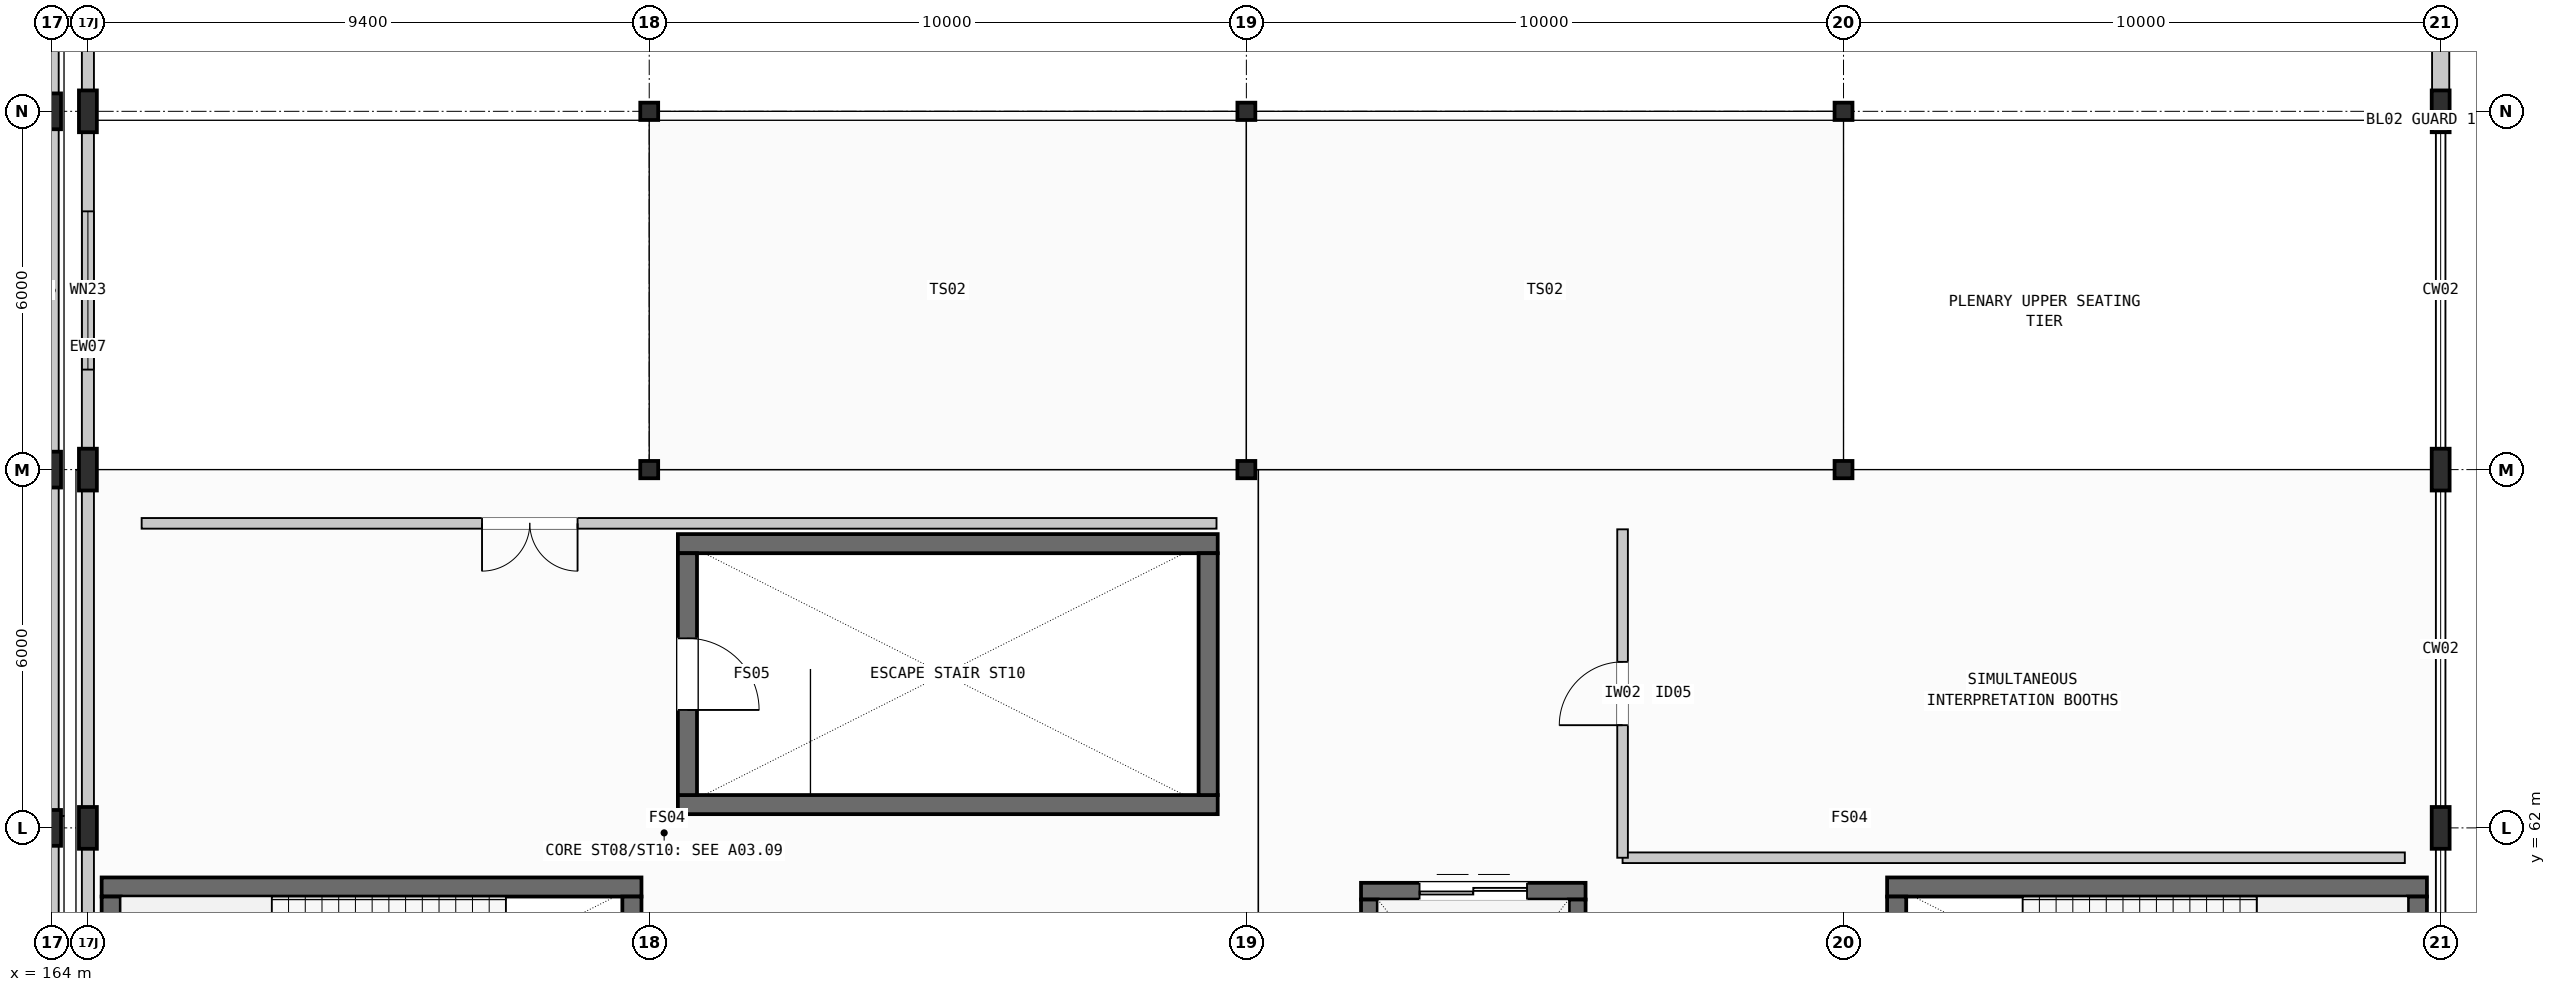
"""IFC4 building model, lengths in metres.
Left out: names, types, materials, properties, quantities, classifications, styles, units other than length and angle.
Written with IfcOpenShell. Run it as: python <this file> out.ifc"""

import sys

from ifc_helpers import new_model, si_unit, direction, frame, frame_2d, origin, origin_2d, place, context, subcontext, project, spatial, rectangle, i_section, extrude, element, fill, save


model = new_model("IFC4")
c1 = context("Model", 3, precision=1e-05, world=origin(), true_north=direction((0.0, 1.0)))
c2 = subcontext(c1, "Body", "Model", "MODEL_VIEW")
j1 = project(units=[si_unit("LENGTHUNIT", "METRE"), si_unit("PLANEANGLEUNIT", "RADIAN")], contexts=[c1])
p1 = place(None, origin())
s1 = spatial("IfcSite", under=j1, at=p1, CompositionType="ELEMENT")
p2 = place(p1, origin())
s2 = spatial("IfcBuilding", under=s1, at=p2, CompositionType="ELEMENT")
p3 = place(p2, frame((0.0, 0.0, 11.4)))
s3 = spatial("IfcBuildingStorey", under=s2, at=p3, CompositionType="ELEMENT", Elevation=11.4)
for number, where, z_axis, x_axis in (
    (1, (164.0, 62.0, 0.0), (0.0, 0.0, 1.0), (1.0, 0.0, 0.0)),
    (2, (164.0, 68.0, 0.0), (0.0, 0.0, 1.0), (1.0, 0.0, 0.0)),
    (3, (164.0, 74.0, 0.0), (0.0, 0.0, 1.0), (1.0, 0.0, 0.0)),
):
    element("IfcColumn", number, at=place(p3, frame(where, z_axis=z_axis, x_axis=x_axis)), inside=s3, PredefinedType="COLUMN", context=c2, shape_type="SweptSolid", body=[
        extrude(i_section(OverallWidth=0.3, OverallDepth=0.6, WebThickness=0.015, FlangeThickness=0.03, FilletRadius=0.027, at=origin_2d()), origin(), (0.0, 0.0, 1.0), 5.4),
    ])
for number, where, z_axis, x_axis in (
    (4, (164.6, 62.0, 0.0), (0.0, 0.0, 1.0), (1.0, 0.0, 0.0)),
    (5, (164.6, 68.0, 0.0), (0.0, 0.0, 1.0), (1.0, 0.0, 0.0)),
    (6, (164.6, 74.0, 0.0), (0.0, 0.0, 1.0), (1.0, 0.0, 0.0)),
):
    element("IfcColumn", number, at=place(p3, frame(where, z_axis=z_axis, x_axis=x_axis)), inside=s3, PredefinedType="COLUMN", context=c2, shape_type="SweptSolid", body=[
        extrude(i_section(OverallWidth=0.3, OverallDepth=0.7, WebThickness=0.017, FlangeThickness=0.032, FilletRadius=0.027, at=origin_2d()), origin(), (0.0, 0.0, 1.0), 5.4),
    ])
for number, where, z_axis, x_axis in (
    (7, (174.0, 68.0, 0.0), (0.0, 0.0, 1.0), (1.0, 0.0, 0.0)),
    (8, (174.0, 74.0, 0.0), (0.0, 0.0, 1.0), (1.0, 0.0, 0.0)),
    (9, (184.0, 68.0, 0.0), (0.0, 0.0, 1.0), (1.0, 0.0, 0.0)),
    (10, (184.0, 74.0, 0.0), (0.0, 0.0, 1.0), (1.0, 0.0, 0.0)),
    (11, (194.0, 68.0, 0.0), (0.0, 0.0, 1.0), (1.0, 0.0, 0.0)),
    (12, (194.0, 74.0, 0.0), (0.0, 0.0, 1.0), (1.0, 0.0, 0.0)),
):
    element("IfcColumn", number, at=place(p3, frame(where, z_axis=z_axis, x_axis=x_axis)), inside=s3, PredefinedType="COLUMN", context=c2, shape_type="SweptSolid", body=[
        extrude(i_section(OverallWidth=0.3, OverallDepth=0.29, WebThickness=0.009, FlangeThickness=0.014, FilletRadius=0.027, at=origin_2d()), origin(), (0.0, 0.0, 1.0), 5.4),
    ])
for number, where, z_axis, x_axis in (
    (13, (204.0, 62.0, 0.0), (0.0, 0.0, 1.0), (1.0, 0.0, 0.0)),
    (14, (204.0, 68.0, 0.0), (0.0, 0.0, 1.0), (1.0, 0.0, 0.0)),
    (15, (204.0, 74.0, 0.0), (0.0, 0.0, 1.0), (1.0, 0.0, 0.0)),
):
    element("IfcColumn", number, at=place(p3, frame(where, z_axis=z_axis, x_axis=x_axis)), inside=s3, PredefinedType="COLUMN", context=c2, shape_type="SweptSolid", body=[
        extrude(i_section(OverallWidth=0.3, OverallDepth=0.7, WebThickness=0.017, FlangeThickness=0.032, FilletRadius=0.027, at=origin_2d()), origin(), (0.0, 0.0, 1.0), 5.4),
    ])
p4 = place(p3, frame((164.83, 61.01, 0.0), z_axis=(0.0, 0.0, 1.0), x_axis=(1.0, 0.0, 0.0)))
e16 = element("IfcWall", 16, at=p4, inside=s3, PredefinedType="SHEAR", context=c2, shape_type="SweptSolid", body=[
    extrude(rectangle(XDim=9.04, YDim=0.32, at=frame_2d((4.52, 0.0))), origin(), (0.0, 0.0, 1.0), 5.4),
])
p5 = place(p3, frame((164.99, 56.8, 0.0), z_axis=(0.0, 0.0, 1.0), x_axis=(0.0, 1.0, 0.0)))
e17 = element("IfcWall", 17, at=p5, inside=s3, PredefinedType="SHEAR", context=c2, shape_type="SweptSolid", body=[
    extrude(rectangle(XDim=4.05, YDim=0.32, at=frame_2d((2.025, 0.0))), origin(), (0.0, 0.0, 1.0), 5.4),
])
p6 = place(p3, frame((173.71, 56.8, 0.0), z_axis=(0.0, 0.0, 1.0), x_axis=(0.0, 1.0, 0.0)))
e18 = element("IfcWall", 18, at=p6, inside=s3, PredefinedType="SHEAR", context=c2, shape_type="SweptSolid", body=[
    extrude(rectangle(XDim=4.05, YDim=0.32, at=frame_2d((2.025, 0.0))), origin(), (0.0, 0.0, 1.0), 5.4),
])
p7 = place(p6, frame((1.425, 0.0, 0.0)))
e19 = element("IfcOpeningElement", 19, at=p7, cuts=e18, PredefinedType="OPENING", context=c2, shape_type="SweptSolid", body=[
    extrude(rectangle(XDim=1.2, YDim=2.2, at=frame_2d((0.6, 1.1))), frame((0.0, 0.17, 0.0), z_axis=(0.0, -1.0, 0.0), x_axis=(1.0, 0.0, 0.0)), (0.0, 0.0, 1.0), 0.34),
])
p8 = place(p3, frame((194.73, 61.01, 0.0), z_axis=(0.0, 0.0, 1.0), x_axis=(1.0, 0.0, 0.0)))
e20 = element("IfcWall", 20, at=p8, inside=s3, PredefinedType="SHEAR", context=c2, shape_type="SweptSolid", body=[
    extrude(rectangle(XDim=9.04, YDim=0.32, at=frame_2d((4.52, 0.0))), origin(), (0.0, 0.0, 1.0), 5.4),
])
p9 = place(p3, frame((194.89, 56.8, 0.0), z_axis=(0.0, 0.0, 1.0), x_axis=(0.0, 1.0, 0.0)))
e21 = element("IfcWall", 21, at=p9, inside=s3, PredefinedType="SHEAR", context=c2, shape_type="SweptSolid", body=[
    extrude(rectangle(XDim=4.05, YDim=0.32, at=frame_2d((2.025, 0.0))), origin(), (0.0, 0.0, 1.0), 5.4),
])
p10 = place(p9, frame((1.425, 0.0, 0.0)))
e22 = element("IfcOpeningElement", 22, at=p10, cuts=e21, PredefinedType="OPENING", context=c2, shape_type="SweptSolid", body=[
    extrude(rectangle(XDim=1.2, YDim=2.2, at=frame_2d((0.6, 1.1))), frame((0.0, 0.17, 0.0), z_axis=(0.0, -1.0, 0.0), x_axis=(1.0, 0.0, 0.0)), (0.0, 0.0, 1.0), 0.34),
])
p11 = place(p3, frame((203.61, 56.8, 0.0), z_axis=(0.0, 0.0, 1.0), x_axis=(0.0, 1.0, 0.0)))
e23 = element("IfcWall", 23, at=p11, inside=s3, PredefinedType="SHEAR", context=c2, shape_type="SweptSolid", body=[
    extrude(rectangle(XDim=4.05, YDim=0.32, at=frame_2d((2.025, 0.0))), origin(), (0.0, 0.0, 1.0), 5.4),
])
for number, where, z_axis, x_axis in (
    (24, (174.48, 62.39, 0.0), (0.0, 0.0, 1.0), (1.0, 0.0, 0.0)),
    (25, (174.48, 66.76, 0.0), (0.0, 0.0, 1.0), (1.0, 0.0, 0.0)),
):
    element("IfcWall", number, at=place(p3, frame(where, z_axis=z_axis, x_axis=x_axis)), inside=s3, PredefinedType="SHEAR", context=c2, shape_type="SweptSolid", body=[
        extrude(rectangle(XDim=9.04, YDim=0.32, at=frame_2d((4.52, 0.0))), origin(), (0.0, 0.0, 1.0), 4.2),
    ])
p12 = place(p3, frame((174.64, 62.55, 0.0), z_axis=(0.0, 0.0, 1.0), x_axis=(0.0, 1.0, 0.0)))
e26 = element("IfcWall", 26, at=p12, inside=s3, PredefinedType="SHEAR", context=c2, shape_type="SweptSolid", body=[
    extrude(rectangle(XDim=4.05, YDim=0.32, at=frame_2d((2.025, 0.0))), origin(), (0.0, 0.0, 1.0), 4.2),
])
p13 = place(p12, frame((1.425, 0.0, 0.0)))
e27 = element("IfcOpeningElement", 27, at=p13, cuts=e26, PredefinedType="OPENING", context=c2, shape_type="SweptSolid", body=[
    extrude(rectangle(XDim=1.2, YDim=2.2, at=frame_2d((0.6, 1.1))), frame((0.0, 0.17, 0.0), z_axis=(0.0, -1.0, 0.0), x_axis=(1.0, 0.0, 0.0)), (0.0, 0.0, 1.0), 0.34),
])
p14 = place(p3, frame((183.36, 62.55, 0.0), z_axis=(0.0, 0.0, 1.0), x_axis=(0.0, 1.0, 0.0)))
e28 = element("IfcWall", 28, at=p14, inside=s3, PredefinedType="SHEAR", context=c2, shape_type="SweptSolid", body=[
    extrude(rectangle(XDim=4.05, YDim=0.32, at=frame_2d((2.025, 0.0))), origin(), (0.0, 0.0, 1.0), 4.2),
])
p15 = place(p3, frame((185.92, 60.94, 0.0), z_axis=(0.0, 0.0, 1.0), x_axis=(1.0, 0.0, 0.0)))
e29 = element("IfcWall", 29, at=p15, inside=s3, PredefinedType="SHEAR", context=c2, shape_type="SweptSolid", body=[
    extrude(rectangle(XDim=3.76, YDim=0.28, at=frame_2d((1.88, 0.0))), origin(), (0.0, 0.0, 1.0), 4.2),
])
p16 = place(p15, frame((0.98, 0.0, 0.0)))
e30 = element("IfcOpeningElement", 30, at=p16, cuts=e29, PredefinedType="OPENING", context=c2, shape_type="SweptSolid", body=[
    extrude(rectangle(XDim=1.8, YDim=2.3, at=frame_2d((0.9, 1.15))), frame((0.0, 0.15, 0.0), z_axis=(0.0, -1.0, 0.0), x_axis=(1.0, 0.0, 0.0)), (0.0, 0.0, 1.0), 0.3),
])
for number, where, z_axis, x_axis in (
    (31, (186.06, 56.8, 0.0), (0.0, 0.0, 1.0), (0.0, 1.0, 0.0)),
    (32, (189.54, 56.8, 0.0), (0.0, 0.0, 1.0), (0.0, 1.0, 0.0)),
):
    element("IfcWall", number, at=place(p3, frame(where, z_axis=z_axis, x_axis=x_axis)), inside=s3, PredefinedType="SHEAR", context=c2, shape_type="SweptSolid", body=[
        extrude(rectangle(XDim=4.0, YDim=0.28, at=frame_2d((2.0, 0.0))), origin(), (0.0, 0.0, 1.0), 4.2),
    ])
for number, where, z_axis, x_axis in (
    (33, (164.6, 56.346, 0.0), (0.0, 0.0, 1.0), (0.0, 1.0, 0.0)),
    (34, (164.6, 62.346, 0.0), (0.0, 0.0, 1.0), (0.0, 1.0, 0.0)),
):
    element("IfcWall", number, at=place(p3, frame(where, z_axis=z_axis, x_axis=x_axis)), inside=s3, PredefinedType="STANDARD", context=c2, shape_type="SweptSolid", body=[
        extrude(rectangle(XDim=5.308, YDim=0.202, at=frame_2d((2.654, 0.0))), origin(), (0.0, 0.0, 1.0), 4.548),
    ])
p17 = place(p3, frame((164.6, 68.346, 0.0), z_axis=(0.0, 0.0, 1.0), x_axis=(0.0, 1.0, 0.0)))
e35 = element("IfcWall", 35, at=p17, inside=s3, PredefinedType="STANDARD", context=c2, shape_type="SweptSolid", body=[
    extrude(rectangle(XDim=5.308, YDim=0.202, at=frame_2d((2.654, 0.0))), origin(), (0.0, 0.0, 1.0), 4.548),
])
p18 = place(p17, frame((1.329, 0.0, 1.0)))
e36 = element("IfcOpeningElement", 36, at=p18, cuts=e35, PredefinedType="OPENING", context=c2, shape_type="SweptSolid", body=[
    extrude(rectangle(XDim=2.65, YDim=2.35, at=frame_2d((1.325, 1.175))), frame((0.0, 0.111, 0.0), z_axis=(0.0, -1.0, 0.0), x_axis=(1.0, 0.0, 0.0)), (0.0, 0.0, 1.0), 0.222),
])
p19 = place(p3, frame((204.0, 74.346, 0.0), z_axis=(0.0, 0.0, 1.0), x_axis=(0.0, 1.0, 0.0)))
e37 = element("IfcWall", 37, at=p19, inside=s3, PredefinedType="STANDARD", context=c2, shape_type="SweptSolid", body=[
    extrude(rectangle(XDim=5.308, YDim=0.288, at=frame_2d((2.654, 0.0))), origin(), (0.0, 0.0, 1.0), 4.6),
])
p20 = place(p19, frame((1.004, 0.0, 1.0)))
e38 = element("IfcOpeningElement", 38, at=p20, cuts=e37, PredefinedType="OPENING", context=c2, shape_type="SweptSolid", body=[
    extrude(rectangle(XDim=3.3, YDim=2.35, at=frame_2d((1.65, 1.175))), frame((0.0, 0.154, 0.0), z_axis=(0.0, -1.0, 0.0), x_axis=(1.0, 0.0, 0.0)), (0.0, 0.0, 1.0), 0.308),
])
p21 = place(p3, frame((164.6, 74.346, 0.0), z_axis=(0.0, 0.0, 1.0), x_axis=(0.0, 1.0, 0.0)))
e39 = element("IfcWall", 39, at=p21, inside=s3, PredefinedType="STANDARD", context=c2, shape_type="SweptSolid", body=[
    extrude(rectangle(XDim=5.308, YDim=0.202, at=frame_2d((2.654, 0.0))), origin(), (0.0, 0.0, 1.0), 4.6),
])
p22 = place(p21, frame((1.929, 0.0, 1.0)))
e40 = element("IfcOpeningElement", 40, at=p22, cuts=e39, PredefinedType="OPENING", context=c2, shape_type="SweptSolid", body=[
    extrude(rectangle(XDim=1.45, YDim=2.2, at=frame_2d((0.725, 1.1))), frame((0.0, 0.111, 0.0), z_axis=(0.0, -1.0, 0.0), x_axis=(1.0, 0.0, 0.0)), (0.0, 0.0, 1.0), 0.222),
])
p23 = place(p3, frame((164.0, 55.196, 0.0), z_axis=(0.0, 0.0, 1.0), x_axis=(0.0, 1.0, 0.0)))
e41 = element("IfcWall", 41, at=p23, inside=s3, PredefinedType="STANDARD", context=c2, shape_type="SweptSolid", body=[
    extrude(rectangle(XDim=6.508, YDim=0.222, at=frame_2d((3.254, 0.0))), origin(), (0.0, 0.0, 1.0), 4.548),
])
for number, where, z_axis, x_axis in (
    (42, (164.0, 62.296, 0.0), (0.0, 0.0, 1.0), (0.0, 1.0, 0.0)),
    (43, (164.0, 68.296, 0.0), (0.0, 0.0, 1.0), (0.0, 1.0, 0.0)),
    (44, (164.0, 74.296, 0.0), (0.0, 0.0, 1.0), (0.0, 1.0, 0.0)),
):
    element("IfcWall", number, at=place(p3, frame(where, z_axis=z_axis, x_axis=x_axis)), inside=s3, PredefinedType="STANDARD", context=c2, shape_type="SweptSolid", body=[
        extrude(rectangle(XDim=5.408, YDim=0.222, at=frame_2d((2.704, 0.0))), origin(), (0.0, 0.0, 1.0), 4.548),
    ])
p24 = place(p3, frame((165.5, 67.1, 0.0), z_axis=(0.0, 0.0, 1.0), x_axis=(1.0, 0.0, 0.0)))
e45 = element("IfcWall", 45, at=p24, inside=s3, PredefinedType="PARTITIONING", context=c2, shape_type="SweptSolid", body=[
    extrude(rectangle(XDim=18.0, YDim=0.178, at=frame_2d((9.0, 0.0))), origin(), (0.0, 0.0, 1.0), 4.4),
])
p25 = place(p24, frame((5.7, 0.0, 0.0)))
e46 = element("IfcOpeningElement", 46, at=p25, cuts=e45, PredefinedType="OPENING", context=c2, shape_type="SweptSolid", body=[
    extrude(rectangle(XDim=1.6, YDim=2.2, at=frame_2d((0.8, 1.1))), frame((0.0, 0.099, 0.0), z_axis=(0.0, -1.0, 0.0), x_axis=(1.0, 0.0, 0.0)), (0.0, 0.0, 1.0), 0.198),
])
p26 = place(p3, frame((190.3, 61.5, 0.0), z_axis=(0.0, 0.0, 1.0), x_axis=(1.0, 0.0, 0.0)))
e47 = element("IfcWall", 47, at=p26, inside=s3, PredefinedType="PARTITIONING", context=c2, shape_type="SweptSolid", body=[
    extrude(rectangle(XDim=13.1, YDim=0.178, at=frame_2d((6.55, 0.0))), origin(), (0.0, 0.0, 1.0), 4.4),
])
p27 = place(p3, frame((190.3, 61.5, 0.0), z_axis=(0.0, 0.0, 1.0), x_axis=(0.0, 1.0, 0.0)))
e48 = element("IfcWall", 48, at=p27, inside=s3, PredefinedType="PARTITIONING", context=c2, shape_type="SweptSolid", body=[
    extrude(rectangle(XDim=5.5, YDim=0.178, at=frame_2d((2.75, 0.0))), origin(), (0.0, 0.0, 1.0), 4.4),
])
p28 = place(p27, frame((2.22, 0.0, 0.0)))
e49 = element("IfcOpeningElement", 49, at=p28, cuts=e48, PredefinedType="OPENING", context=c2, shape_type="SweptSolid", body=[
    extrude(rectangle(XDim=1.06, YDim=2.18, at=frame_2d((0.53, 1.09))), frame((0.0, 0.099, 0.0), z_axis=(0.0, -1.0, 0.0), x_axis=(1.0, 0.0, 0.0)), (0.0, 0.0, 1.0), 0.198),
])
p29 = place(p18, origin())
e50 = element("IfcWindow", 50, at=p29, inside=s3, PartitioningType="SINGLE_PANEL", PredefinedType="WINDOW", context=c2, shape_type="SweptSolid", body=[
    extrude(rectangle(XDim=2.65, YDim=2.35, at=frame_2d((1.325, 1.175))), frame((0.0, 0.03, 0.0), z_axis=(0.0, -1.0, 0.0), x_axis=(1.0, 0.0, 0.0)), (0.0, 0.0, 1.0), 0.06),
])
fill(e36, e50)
p30 = place(p13, frame((1.2, 0.0, 0.0), z_axis=(0.0, 0.0, 1.0), x_axis=(-1.0, 0.0, 0.0)))
e51 = element("IfcDoor", 51, at=p30, inside=s3, OperationType="SINGLE_SWING_RIGHT", PredefinedType="DOOR", context=c2, shape_type="SweptSolid", body=[
    extrude(rectangle(XDim=1.2, YDim=2.2, at=frame_2d((0.6, 1.1))), frame((0.0, 0.025, 0.0), z_axis=(0.0, -1.0, 0.0), x_axis=(1.0, 0.0, 0.0)), (0.0, 0.0, 1.0), 0.05),
])
fill(e27, e51)
p31 = place(p16, origin())
e52 = element("IfcDoor", 52, at=p31, inside=s3, OperationType="DOUBLE_DOOR_SLIDING", PredefinedType="DOOR", context=c2, shape_type="SweptSolid", body=[
    extrude(rectangle(XDim=1.8, YDim=2.3, at=frame_2d((0.9, 1.15))), frame((0.0, 0.025, 0.0), z_axis=(0.0, -1.0, 0.0), x_axis=(1.0, 0.0, 0.0)), (0.0, 0.0, 1.0), 0.05),
])
fill(e30, e52)
p32 = place(p25, frame((1.6, 0.0, 0.0), z_axis=(0.0, 0.0, 1.0), x_axis=(-1.0, 0.0, 0.0)))
e53 = element("IfcDoor", 53, at=p32, inside=s3, OperationType="DOUBLE_DOOR_SINGLE_SWING", PredefinedType="DOOR", context=c2, shape_type="SweptSolid", body=[
    extrude(rectangle(XDim=1.6, YDim=2.2, at=frame_2d((0.8, 1.1))), frame((0.0, 0.025, 0.0), z_axis=(0.0, -1.0, 0.0), x_axis=(1.0, 0.0, 0.0)), (0.0, 0.0, 1.0), 0.05),
])
fill(e46, e53)
p33 = place(p28, origin())
e54 = element("IfcDoor", 54, at=p33, inside=s3, OperationType="SINGLE_SWING_LEFT", PredefinedType="DOOR", context=c2, shape_type="SweptSolid", body=[
    extrude(rectangle(XDim=1.06, YDim=2.18, at=frame_2d((0.53, 1.09))), frame((0.0, 0.025, 0.0), z_axis=(0.0, -1.0, 0.0), x_axis=(1.0, 0.0, 0.0)), (0.0, 0.0, 1.0), 0.05),
])
fill(e49, e54)
save(model, sys.argv[1])
